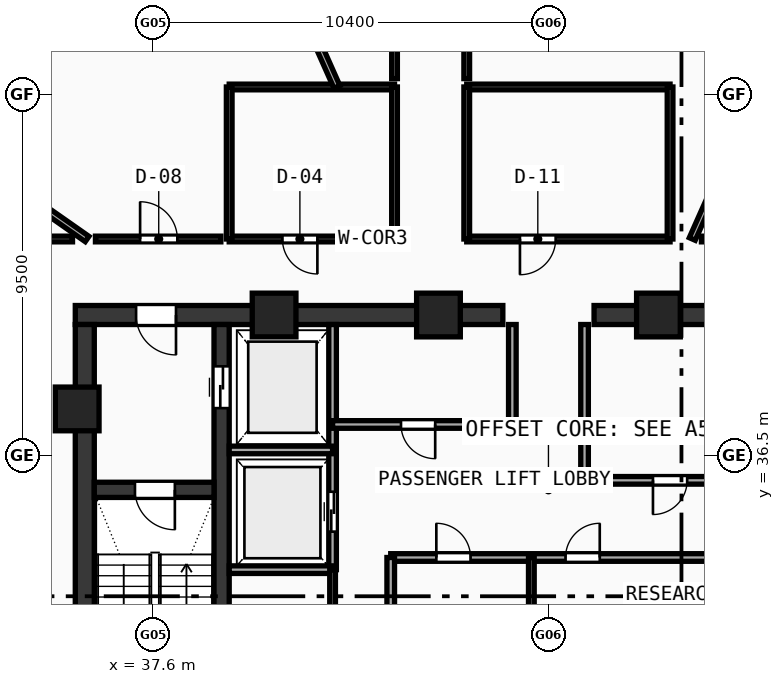
"""IFC4 building model, lengths in metres.
Left out: names, types, materials, properties, quantities, classifications, styles, units other than length and angle.
Written with IfcOpenShell. Run it as: python <this file> out.ifc"""

import sys

from ifc_helpers import new_model, si_unit, direction, frame, frame_2d, origin, origin_with_axes, origin_2d, place, context, subcontext, project, spatial, rectangle, hollow_rectangle, extrude, source, transform, mapped, element, fill, save


model = new_model("IFC4")
c1 = context("Model", 3, precision=1e-05, world=origin(), true_north=direction((0.0, 1.0)))
c2 = subcontext(c1, "Body", "Model", "MODEL_VIEW")
j1 = project(units=[si_unit("LENGTHUNIT", "METRE"), si_unit("PLANEANGLEUNIT", "RADIAN")], contexts=[c1])
p1 = place(None, origin())
s1 = spatial("IfcSite", under=j1, at=p1, CompositionType="ELEMENT")
p2 = place(p1, origin())
s2 = spatial("IfcBuilding", under=s1, at=p2, CompositionType="ELEMENT")
p3 = place(p2, frame((0.0, 0.0, 266.91)))
s3 = spatial("IfcBuildingStorey", under=s2, at=p3, CompositionType="ELEMENT", Elevation=266.91)
p4 = place(p3, frame((35.55, 40.2, 0.0), z_axis=(0.0, 0.0, 1.0), x_axis=(1.0, 0.0, 0.0)))
e1 = element("IfcWall", 1, at=p4, inside=s3, PredefinedType="SHEAR", context=c2, shape_type="SweptSolid", body=[
    extrude(rectangle(XDim=11.25, YDim=0.5, at=frame_2d((5.625, 0.0))), origin(), (0.0, 0.0, 1.0), 5.57),
])
p5 = place(p4, frame((1.6, 0.0, 0.0)))
e2 = element("IfcOpeningElement", 2, at=p5, cuts=e1, PredefinedType="OPENING", context=c2, shape_type="SweptSolid", body=[
    extrude(rectangle(XDim=1.05, YDim=2.1, at=frame_2d((0.525, 1.05))), frame((0.0, 0.26, 0.0), z_axis=(0.0, -1.0, 0.0), x_axis=(1.0, 0.0, 0.0)), (0.0, 0.0, 1.0), 0.52),
])
p6 = place(p3, frame((49.2, 40.2, 0.0), z_axis=(0.0, 0.0, 1.0), x_axis=(1.0, 0.0, 0.0)))
e3 = element("IfcWall", 3, at=p6, inside=s3, PredefinedType="SHEAR", context=c2, shape_type="SweptSolid", body=[
    extrude(rectangle(XDim=11.25, YDim=0.5, at=frame_2d((5.625, 0.0))), origin(), (0.0, 0.0, 1.0), 5.57),
])
p7 = place(p6, frame((8.6, 0.0, 0.0)))
e4 = element("IfcOpeningElement", 4, at=p7, cuts=e3, PredefinedType="OPENING", context=c2, shape_type="SweptSolid", body=[
    extrude(rectangle(XDim=1.05, YDim=2.1, at=frame_2d((0.525, 1.05))), frame((0.0, 0.26, 0.0), z_axis=(0.0, -1.0, 0.0), x_axis=(1.0, 0.0, 0.0)), (0.0, 0.0, 1.0), 0.52),
])
p8 = place(p3, frame((35.8, 27.75, 0.0), z_axis=(0.0, 0.0, 1.0), x_axis=(0.0, 1.0, 0.0)))
e5 = element("IfcWall", 5, at=p8, inside=s3, PredefinedType="SHEAR", context=c2, shape_type="SweptSolid", body=[
    extrude(rectangle(XDim=12.2, YDim=0.5, at=frame_2d((6.1, 0.0))), origin(), (0.0, 0.0, 1.0), 5.57),
])
p9 = place(p3, frame((39.4, 27.75, 0.0), z_axis=(0.0, 0.0, 1.0), x_axis=(0.0, 1.0, 0.0)))
e6 = element("IfcWall", 6, at=p9, inside=s3, PredefinedType="SHEAR", context=c2, shape_type="SweptSolid", body=[
    extrude(rectangle(XDim=12.2, YDim=0.4, at=frame_2d((6.1, 0.0))), origin(), (0.0, 0.0, 1.0), 5.57),
])
p10 = place(p9, frame((10.0, 0.0, 0.0)))
e7 = element("IfcOpeningElement", 7, at=p10, cuts=e6, PredefinedType="OPENING", context=c2, shape_type="SweptSolid", body=[
    extrude(rectangle(XDim=1.1, YDim=2.1, at=frame_2d((0.55, 1.05))), frame((0.0, 0.21, 0.0), z_axis=(0.0, -1.0, 0.0), x_axis=(1.0, 0.0, 0.0)), (0.0, 0.0, 1.0), 0.42),
])
p11 = place(p3, frame((36.05, 35.6, 0.0), z_axis=(0.0, 0.0, 1.0), x_axis=(1.0, 0.0, 0.0)))
e8 = element("IfcWall", 8, at=p11, inside=s3, PredefinedType="SHEAR", context=c2, shape_type="SweptSolid", body=[
    extrude(rectangle(XDim=3.15, YDim=0.4, at=frame_2d((1.575, 0.0))), origin(), (0.0, 0.0, 1.0), 5.57),
])
p12 = place(p11, frame((1.07, 0.0, 0.0)))
e9 = element("IfcOpeningElement", 9, at=p12, cuts=e8, PredefinedType="OPENING", context=c2, shape_type="SweptSolid", body=[
    extrude(rectangle(XDim=1.05, YDim=2.1, at=frame_2d((0.525, 1.05))), frame((0.0, 0.21, 0.0), z_axis=(0.0, -1.0, 0.0), x_axis=(1.0, 0.0, 0.0)), (0.0, 0.0, 1.0), 0.42),
])
m1 = source(origin(), c2, "Body", "SweptSolid", [
    extrude(hollow_rectangle(XDim=1.15, YDim=1.15, WallThickness=0.048, at=origin_2d()), origin(), (0.0, 0.0, 1.0), 5.83),
])
for number, where, z_axis, x_axis in (
    (10, (50.894, 40.2, -0.26), (0.0, 0.0, 1.0), (1.0, 0.0, 0.0)),
    (11, (45.106, 40.2, -0.26), (0.0, 0.0, 1.0), (1.0, 0.0, 0.0)),
    (12, (40.781, 40.2, -0.26), (0.0, 0.0, 1.0), (1.0, 0.0, 0.0)),
    (13, (35.6, 37.729, -0.26), (0.0, 0.0, 1.0), (1.0, 0.0, 0.0)),
):
    element("IfcColumn", number, at=place(p3, frame(where, z_axis=z_axis, x_axis=x_axis)), inside=s3, PredefinedType="COLUMN", context=c2, shape_type="MappedRepresentation", body=[
        mapped(m1, transform((0.0, 0.0, 0.0), scale=1.0)),
    ])
p13 = place(p3, frame((42.32, 33.5, 0.0), z_axis=(0.0, 0.0, 1.0), x_axis=(0.0, 1.0, 0.0)))
e14 = element("IfcWall", 14, at=p13, inside=s3, PredefinedType="SOLIDWALL", context=c2, shape_type="SweptSolid", body=[
    extrude(rectangle(XDim=6.45, YDim=0.2, at=frame_2d((3.225, 0.0))), origin(), (0.0, 0.0, 1.0), 5.57),
])
p14 = place(p13, frame((1.0, 0.0, 0.0)))
e15 = element("IfcOpeningElement", 15, at=p14, cuts=e14, PredefinedType="OPENING", context=c2, shape_type="SweptSolid", body=[
    extrude(rectangle(XDim=1.05, YDim=2.1, at=frame_2d((0.525, 1.05))), frame((0.0, 0.11, 0.0), z_axis=(0.0, -1.0, 0.0), x_axis=(1.0, 0.0, 0.0)), (0.0, 0.0, 1.0), 0.22),
])
for number, where, z_axis, x_axis in (
    (16, (39.6, 36.65, 0.0), (0.0, 0.0, 1.0), (1.0, 0.0, 0.0)),
    (17, (39.6, 33.5, 0.0), (0.0, 0.0, 1.0), (1.0, 0.0, 0.0)),
):
    element("IfcWall", number, at=place(p3, frame(where, z_axis=z_axis, x_axis=x_axis)), inside=s3, PredefinedType="SOLIDWALL", context=c2, shape_type="SweptSolid", body=[
        extrude(rectangle(XDim=2.72, YDim=0.2, at=frame_2d((1.36, 0.0))), origin(), (0.0, 0.0, 1.0), 5.57),
    ])
p15 = place(p3, frame((42.32, 37.32, 0.0), z_axis=(0.0, 0.0, 1.0), x_axis=(1.0, 0.0, 0.0)))
e18 = element("IfcWall", 18, at=p15, inside=s3, PredefinedType="SOLIDWALL", context=c2, shape_type="SweptSolid", body=[
    extrude(rectangle(XDim=4.73, YDim=0.2, at=frame_2d((2.365, 0.0))), origin(), (0.0, 0.0, 1.0), 5.57),
])
p16 = place(p15, frame((1.8, 0.0, 0.0)))
e19 = element("IfcOpeningElement", 19, at=p16, cuts=e18, PredefinedType="OPENING", context=c2, shape_type="SweptSolid", body=[
    extrude(rectangle(XDim=0.9, YDim=2.1, at=frame_2d((0.45, 1.05))), frame((0.0, 0.11, 0.0), z_axis=(0.0, -1.0, 0.0), x_axis=(1.0, 0.0, 0.0)), (0.0, 0.0, 1.0), 0.22),
])
p17 = place(p3, frame((48.95, 35.85, 0.0), z_axis=(0.0, 0.0, 1.0), x_axis=(1.0, 0.0, 0.0)))
e20 = element("IfcWall", 20, at=p17, inside=s3, PredefinedType="SOLIDWALL", context=c2, shape_type="SweptSolid", body=[
    extrude(rectangle(XDim=4.73, YDim=0.2, at=frame_2d((2.365, 0.0))), origin(), (0.0, 0.0, 1.0), 5.57),
])
p18 = place(p17, frame((1.8, 0.0, 0.0)))
e21 = element("IfcOpeningElement", 21, at=p18, cuts=e20, PredefinedType="OPENING", context=c2, shape_type="SweptSolid", body=[
    extrude(rectangle(XDim=0.9, YDim=2.1, at=frame_2d((0.45, 1.05))), frame((0.0, 0.11, 0.0), z_axis=(0.0, -1.0, 0.0), x_axis=(1.0, 0.0, 0.0)), (0.0, 0.0, 1.0), 0.22),
])
p19 = place(p3, frame((47.05, 37.32, 0.0), z_axis=(0.0, 0.0, 1.0), x_axis=(0.0, 1.0, 0.0)))
e22 = element("IfcWall", 22, at=p19, inside=s3, PredefinedType="SOLIDWALL", context=c2, shape_type="SweptSolid", body=[
    extrude(rectangle(XDim=2.63, YDim=0.2, at=frame_2d((1.315, 0.0))), origin(), (0.0, 0.0, 1.0), 5.57),
])
p20 = place(p3, frame((48.95, 35.85, 0.0), z_axis=(0.0, 0.0, 1.0), x_axis=(0.0, 1.0, 0.0)))
e23 = element("IfcWall", 23, at=p20, inside=s3, PredefinedType="SOLIDWALL", context=c2, shape_type="SweptSolid", body=[
    extrude(rectangle(XDim=4.1, YDim=0.2, at=frame_2d((2.05, 0.0))), origin(), (0.0, 0.0, 1.0), 5.57),
])
p21 = place(p3, frame((43.85, 33.82, 0.0), z_axis=(0.0, 0.0, 1.0), x_axis=(1.0, 0.0, 0.0)))
e24 = element("IfcWall", 24, at=p21, inside=s3, PredefinedType="SOLIDWALL", context=c2, shape_type="SweptSolid", body=[
    extrude(rectangle(XDim=9.83, YDim=0.2, at=frame_2d((4.915, 0.0))), origin(), (0.0, 0.0, 1.0), 5.57),
])
p22 = place(p21, frame((1.2, 0.0, 0.0)))
e25 = element("IfcOpeningElement", 25, at=p22, cuts=e24, PredefinedType="OPENING", context=c2, shape_type="SweptSolid", body=[
    extrude(rectangle(XDim=0.9, YDim=2.1, at=frame_2d((0.45, 1.05))), frame((0.0, 0.11, 0.0), z_axis=(0.0, -1.0, 0.0), x_axis=(1.0, 0.0, 0.0)), (0.0, 0.0, 1.0), 0.22),
])
p23 = place(p21, frame((4.6, 0.0, 0.0)))
e26 = element("IfcOpeningElement", 26, at=p23, cuts=e24, PredefinedType="OPENING", context=c2, shape_type="SweptSolid", body=[
    extrude(rectangle(XDim=0.9, YDim=2.1, at=frame_2d((0.45, 1.05))), frame((0.0, 0.11, 0.0), z_axis=(0.0, -1.0, 0.0), x_axis=(1.0, 0.0, 0.0)), (0.0, 0.0, 1.0), 0.22),
])
p24 = place(p3, frame((43.85, 27.6, 0.0), z_axis=(0.0, 0.0, 1.0), x_axis=(0.0, 1.0, 0.0)))
e27 = element("IfcWall", 27, at=p24, inside=s3, PredefinedType="SOLIDWALL", context=c2, shape_type="SweptSolid", body=[
    extrude(rectangle(XDim=6.22, YDim=0.2, at=frame_2d((3.11, 0.0))), origin(), (0.0, 0.0, 1.0), 5.57),
])
p25 = place(p24, frame((2.25, 0.0, 0.0)))
e28 = element("IfcOpeningElement", 28, at=p25, cuts=e27, PredefinedType="OPENING", context=c2, shape_type="SweptSolid", body=[
    extrude(rectangle(XDim=1.05, YDim=2.1, at=frame_2d((0.525, 1.05))), frame((0.0, 0.11, 0.0), z_axis=(0.0, -1.0, 0.0), x_axis=(1.0, 0.0, 0.0)), (0.0, 0.0, 1.0), 0.22),
])
p26 = place(p3, frame((47.55, 31.12, 0.0), z_axis=(0.0, 0.0, 1.0), x_axis=(0.0, 1.0, 0.0)))
e29 = element("IfcWall", 29, at=p26, inside=s3, PredefinedType="PARTITIONING", context=c2, shape_type="SweptSolid", body=[
    extrude(rectangle(XDim=2.7, YDim=0.15, at=frame_2d((1.35, 0.0))), origin(), (0.0, 0.0, 1.0), 5.57),
])
p27 = place(p3, frame((42.32, 27.6, 0.0), z_axis=(0.0, 0.0, 1.0), x_axis=(0.0, 1.0, 0.0)))
e30 = element("IfcWall", 30, at=p27, inside=s3, PredefinedType="PARTITIONING", context=c2, shape_type="SweptSolid", body=[
    extrude(rectangle(XDim=5.9, YDim=0.15, at=frame_2d((2.95, 0.0))), origin(), (0.0, 0.0, 1.0), 2.22),
])
p28 = place(p27, frame((1.1, 0.0, 0.0)))
e31 = element("IfcOpeningElement", 31, at=p28, cuts=e30, PredefinedType="OPENING", context=c2, shape_type="SweptSolid", body=[
    extrude(rectangle(XDim=0.9, YDim=2.1, at=frame_2d((0.45, 1.05))), frame((0.0, 0.085, 0.0), z_axis=(0.0, -1.0, 0.0), x_axis=(1.0, 0.0, 0.0)), (0.0, 0.0, 1.0), 0.17),
])
p29 = place(p27, frame((3.6, 0.0, 0.0)))
e32 = element("IfcOpeningElement", 32, at=p29, cuts=e30, PredefinedType="OPENING", context=c2, shape_type="SweptSolid", body=[
    extrude(rectangle(XDim=0.94, YDim=2.1, at=frame_2d((0.47, 1.05))), frame((0.0, 0.085, 0.0), z_axis=(0.0, -1.0, 0.0), x_axis=(1.0, 0.0, 0.0)), (0.0, 0.0, 1.0), 0.17),
])
p30 = place(p3, frame((39.6, 42.2, 0.0), z_axis=(0.0, 0.0, 1.0), x_axis=(1.0, 0.0, 0.0)))
e33 = element("IfcWall", 33, at=p30, inside=s3, PredefinedType="PARTITIONING", context=c2, shape_type="SweptSolid", body=[
    extrude(rectangle(XDim=4.35, YDim=0.15, at=frame_2d((2.175, 0.0))), origin(), (0.0, 0.0, 1.0), 2.22),
])
p31 = place(p30, frame((1.4, 0.0, 0.0)))
e34 = element("IfcOpeningElement", 34, at=p31, cuts=e33, PredefinedType="OPENING", context=c2, shape_type="SweptSolid", body=[
    extrude(rectangle(XDim=0.92, YDim=2.1, at=frame_2d((0.46, 1.05))), frame((0.0, 0.085, 0.0), z_axis=(0.0, -1.0, 0.0), x_axis=(1.0, 0.0, 0.0)), (0.0, 0.0, 1.0), 0.17),
])
p32 = place(p3, frame((39.6, 46.2, 0.0), z_axis=(0.0, 0.0, 1.0), x_axis=(1.0, 0.0, 0.0)))
e35 = element("IfcWall", 35, at=p32, inside=s3, PredefinedType="PARTITIONING", context=c2, shape_type="SweptSolid", body=[
    extrude(rectangle(XDim=4.35, YDim=0.15, at=frame_2d((2.175, 0.0))), origin(), (0.0, 0.0, 1.0), 2.22),
])
p33 = place(p3, frame((39.6, 42.2, 0.0), z_axis=(0.0, 0.0, 1.0), x_axis=(0.0, 1.0, 0.0)))
e36 = element("IfcWall", 36, at=p33, inside=s3, PredefinedType="PARTITIONING", context=c2, shape_type="SweptSolid", body=[
    extrude(rectangle(XDim=4.0, YDim=0.15, at=frame_2d((2.0, 0.0))), origin(), (0.0, 0.0, 1.0), 5.22),
])
p34 = place(p3, frame((43.95, 42.2, 0.0), z_axis=(0.0, 0.0, 1.0), x_axis=(0.0, 1.0, 0.0)))
e37 = element("IfcWall", 37, at=p34, inside=s3, PredefinedType="PARTITIONING", context=c2, shape_type="SweptSolid", body=[
    extrude(rectangle(XDim=4.0, YDim=0.15, at=frame_2d((2.0, 0.0))), origin(), (0.0, 0.0, 1.0), 2.22),
])
p35 = place(p3, frame((45.85, 42.2, 0.0), z_axis=(0.0, 0.0, 1.0), x_axis=(1.0, 0.0, 0.0)))
e38 = element("IfcWall", 38, at=p35, inside=s3, PredefinedType="PARTITIONING", context=c2, shape_type="SweptSolid", body=[
    extrude(rectangle(XDim=5.35, YDim=0.15, at=frame_2d((2.675, 0.0))), origin(), (0.0, 0.0, 1.0), 5.57),
])
p36 = place(p35, frame((1.4, 0.0, 0.0)))
e39 = element("IfcOpeningElement", 39, at=p36, cuts=e38, PredefinedType="OPENING", context=c2, shape_type="SweptSolid", body=[
    extrude(rectangle(XDim=0.94, YDim=2.1, at=frame_2d((0.47, 1.05))), frame((0.0, 0.085, 0.0), z_axis=(0.0, -1.0, 0.0), x_axis=(1.0, 0.0, 0.0)), (0.0, 0.0, 1.0), 0.17),
])
p37 = place(p3, frame((45.85, 46.2, 0.0), z_axis=(0.0, 0.0, 1.0), x_axis=(1.0, 0.0, 0.0)))
e40 = element("IfcWall", 40, at=p37, inside=s3, PredefinedType="PARTITIONING", context=c2, shape_type="SweptSolid", body=[
    extrude(rectangle(XDim=5.35, YDim=0.15, at=frame_2d((2.675, 0.0))), origin(), (0.0, 0.0, 1.0), 5.57),
])
for number, where, z_axis, x_axis in (
    (41, (45.85, 42.2, 0.0), (0.0, 0.0, 1.0), (0.0, 1.0, 0.0)),
    (42, (51.2, 42.2, 0.0), (0.0, 0.0, 1.0), (0.0, 1.0, 0.0)),
):
    element("IfcWall", number, at=place(p3, frame(where, z_axis=z_axis, x_axis=x_axis)), inside=s3, PredefinedType="PARTITIONING", context=c2, shape_type="SweptSolid", body=[
        extrude(rectangle(XDim=4.0, YDim=0.15, at=frame_2d((2.0, 0.0))), origin(), (0.0, 0.0, 1.0), 5.57),
    ])
p38 = place(p3, frame((51.784, 42.2, 0.0), z_axis=(0.0, 0.0, 1.0), x_axis=(0.406737985753, 0.913544859843, 0.0)))
e43 = element("IfcWall", 43, at=p38, inside=s3, PredefinedType="PARTITIONING", context=c2, shape_type="SweptSolid", body=[
    extrude(rectangle(XDim=24.707, YDim=0.17, at=frame_2d((12.354, 0.0))), origin(), (0.0, 0.0, 1.0), 2.22),
])
p39 = place(p3, frame((42.435, 46.2, 0.0), z_axis=(0.0, 0.0, 1.0), x_axis=(-0.406734534197, 0.913546396573, 0.0)))
e44 = element("IfcWall", 44, at=p39, inside=s3, PredefinedType="PARTITIONING", context=c2, shape_type="SweptSolid", body=[
    extrude(rectangle(XDim=20.329, YDim=0.17, at=frame_2d((10.164, 0.0))), origin(), (0.0, 0.0, 1.0), 2.22),
])
p40 = place(p3, frame((35.861, 42.2, 0.0), z_axis=(0.0, 0.0, 1.0), x_axis=(-0.819147381932, 0.57358309483, 0.0)))
e45 = element("IfcWall", 45, at=p40, inside=s3, PredefinedType="PARTITIONING", context=c2, shape_type="SweptSolid", body=[
    extrude(rectangle(XDim=13.297, YDim=0.17, at=frame_2d((6.649, 0.0))), origin(), (0.0, 0.0, 1.0), 4.92),
])
p41 = place(p3, frame((33.15, 42.2, 0.0), z_axis=(0.0, 0.0, 1.0), x_axis=(1.0, 0.0, 0.0)))
e46 = element("IfcWall", 46, at=p41, inside=s3, PredefinedType="PARTITIONING", context=c2, shape_type="SweptSolid", body=[
    extrude(rectangle(XDim=2.327, YDim=0.15, at=frame_2d((1.164, 0.0))), origin(), (0.0, 0.0, 1.0), 5.22),
])
p42 = place(p3, frame((36.081, 42.2, 0.0), z_axis=(0.0, 0.0, 1.0), x_axis=(1.0, 0.0, 0.0)))
e47 = element("IfcWall", 47, at=p42, inside=s3, PredefinedType="PARTITIONING", context=c2, shape_type="SweptSolid", body=[
    extrude(rectangle(XDim=3.299, YDim=0.15, at=frame_2d((1.65, 0.0))), origin(), (0.0, 0.0, 1.0), 2.22),
])
p43 = place(p42, frame((1.175, 0.0, 0.0)))
e48 = element("IfcOpeningElement", 48, at=p43, cuts=e47, PredefinedType="OPENING", context=c2, shape_type="SweptSolid", body=[
    extrude(rectangle(XDim=0.98, YDim=2.12, at=frame_2d((0.49, 1.06))), frame((0.0, 0.085, 0.0), z_axis=(0.0, -1.0, 0.0), x_axis=(1.0, 0.0, 0.0)), (0.0, 0.0, 1.0), 0.17),
])
p44 = place(p3, frame((43.95, 46.42, 0.0), z_axis=(0.0, 0.0, 1.0), x_axis=(0.0, 1.0, 0.0)))
e49 = element("IfcWall", 49, at=p44, inside=s3, PredefinedType="PARTITIONING", context=c2, shape_type="SweptSolid", body=[
    extrude(rectangle(XDim=9.36, YDim=0.15, at=frame_2d((4.68, 0.0))), origin(), (0.0, 0.0, 1.0), 5.22),
])
p45 = place(p44, frame((4.11, 0.0, 0.0)))
e50 = element("IfcOpeningElement", 50, at=p45, cuts=e49, PredefinedType="OPENING", context=c2, shape_type="SweptSolid", body=[
    extrude(rectangle(XDim=0.92, YDim=2.1, at=frame_2d((0.46, 1.05))), frame((0.0, 0.085, 0.0), z_axis=(0.0, -1.0, 0.0), x_axis=(1.0, 0.0, 0.0)), (0.0, 0.0, 1.0), 0.17),
])
p46 = place(p3, frame((45.85, 55.78, 0.0), z_axis=(0.0, 0.0, 1.0), x_axis=(0.0, -1.0, 0.0)))
e51 = element("IfcWall", 51, at=p46, inside=s3, PredefinedType="PARTITIONING", context=c2, shape_type="SweptSolid", body=[
    extrude(rectangle(XDim=9.36, YDim=0.15, at=frame_2d((4.68, 0.0))), origin(), (0.0, 0.0, 1.0), 5.22),
])
p47 = place(p3, frame((52.025, 42.2, 0.0), z_axis=(0.0, 0.0, 1.0), x_axis=(1.0, 0.0, 0.0)))
e52 = element("IfcWall", 52, at=p47, inside=s3, PredefinedType="PARTITIONING", context=c2, shape_type="SweptSolid", body=[
    extrude(rectangle(XDim=10.825, YDim=0.15, at=frame_2d((5.413, 0.0))), origin(), (0.0, 0.0, 1.0), 2.22),
])
p48 = place(p47, frame((5.047, 0.0, 0.0)))
e53 = element("IfcOpeningElement", 53, at=p48, cuts=e52, PredefinedType="OPENING", context=c2, shape_type="SweptSolid", body=[
    extrude(rectangle(XDim=0.98, YDim=2.12, at=frame_2d((0.49, 1.06))), frame((0.0, 0.085, 0.0), z_axis=(0.0, -1.0, 0.0), x_axis=(1.0, 0.0, 0.0)), (0.0, 0.0, 1.0), 0.17),
])
m2 = source(origin(), c2, "Body", "SweptSolid", [
    extrude(rectangle(XDim=1.05, YDim=2.1, at=frame_2d((0.525, 1.05))), frame((0.0, 0.025, 0.0), z_axis=(0.0, -1.0, 0.0), x_axis=(1.0, 0.0, 0.0)), (0.0, 0.0, 1.0), 0.05),
])
p49 = place(p12, frame((1.05, 0.0, 0.0), z_axis=(0.0, 0.0, 1.0), x_axis=(-1.0, 0.0, 0.0)))
e54 = element("IfcDoor", 54, at=p49, inside=s3, OperationType="SINGLE_SWING_LEFT", PredefinedType="DOOR", context=c2, shape_type="MappedRepresentation", body=[
    mapped(m2, transform((0.0, 0.0, 0.0), scale=1.0)),
])
fill(e9, e54)
p50 = place(p5, frame((1.05, 0.0, 0.0), z_axis=(0.0, 0.0, 1.0), x_axis=(-1.0, 0.0, 0.0)))
e55 = element("IfcDoor", 55, at=p50, inside=s3, OperationType="SINGLE_SWING_LEFT", PredefinedType="DOOR", context=c2, shape_type="MappedRepresentation", body=[
    mapped(m2, transform((0.0, 0.0, 0.0), scale=1.0)),
])
fill(e2, e55)
m3 = source(origin(), c2, "Body", "SweptSolid", [
    extrude(rectangle(XDim=1.1, YDim=2.1, at=frame_2d((0.55, 1.05))), frame((0.0, 0.025, 0.0), z_axis=(0.0, -1.0, 0.0), x_axis=(1.0, 0.0, 0.0)), (0.0, 0.0, 1.0), 0.05),
])
p51 = place(p10, frame((1.1, 0.0, 0.0), z_axis=(0.0, 0.0, 1.0), x_axis=(-1.0, 0.0, 0.0)))
e56 = element("IfcDoor", 56, at=p51, inside=s3, OperationType="DOUBLE_DOOR_SLIDING", PredefinedType="DOOR", context=c2, shape_type="MappedRepresentation", body=[
    mapped(m3, transform((0.0, 0.0, 0.0), scale=1.0)),
])
fill(e7, e56)
p52 = place(p14, origin_with_axes())
e57 = element("IfcDoor", 57, at=p52, inside=s3, OperationType="DOUBLE_DOOR_SLIDING", PredefinedType="DOOR", context=c2, shape_type="MappedRepresentation", body=[
    mapped(m2, transform((0.0, 0.0, 0.0), scale=1.0)),
])
fill(e15, e57)
m4 = source(origin(), c2, "Body", "SweptSolid", [
    extrude(rectangle(XDim=0.9, YDim=2.1, at=frame_2d((0.45, 1.05))), frame((0.0, 0.025, 0.0), z_axis=(0.0, -1.0, 0.0), x_axis=(1.0, 0.0, 0.0)), (0.0, 0.0, 1.0), 0.05),
])
p53 = place(p16, frame((0.9, 0.0, 0.0), z_axis=(0.0, 0.0, 1.0), x_axis=(-1.0, 0.0, 0.0)))
e58 = element("IfcDoor", 58, at=p53, inside=s3, OperationType="SINGLE_SWING_LEFT", PredefinedType="DOOR", context=c2, shape_type="MappedRepresentation", body=[
    mapped(m4, transform((0.0, 0.0, 0.0), scale=1.0)),
])
fill(e19, e58)
p54 = place(p18, frame((0.9, 0.0, 0.0), z_axis=(0.0, 0.0, 1.0), x_axis=(-1.0, 0.0, 0.0)))
e59 = element("IfcDoor", 59, at=p54, inside=s3, OperationType="SINGLE_SWING_RIGHT", PredefinedType="DOOR", context=c2, shape_type="MappedRepresentation", body=[
    mapped(m4, transform((0.0, 0.0, 0.0), scale=1.0)),
])
fill(e21, e59)
p55 = place(p22, origin_with_axes())
e60 = element("IfcDoor", 60, at=p55, inside=s3, OperationType="SINGLE_SWING_LEFT", PredefinedType="DOOR", context=c2, shape_type="MappedRepresentation", body=[
    mapped(m4, transform((0.0, 0.0, 0.0), scale=1.0)),
])
fill(e25, e60)
p56 = place(p23, origin_with_axes())
e61 = element("IfcDoor", 61, at=p56, inside=s3, OperationType="SINGLE_SWING_RIGHT", PredefinedType="DOOR", context=c2, shape_type="MappedRepresentation", body=[
    mapped(m4, transform((0.0, 0.0, 0.0), scale=1.0)),
])
fill(e26, e61)
m5 = source(origin(), c2, "Body", "SweptSolid", [
    extrude(rectangle(XDim=0.92, YDim=2.1, at=frame_2d((0.46, 1.05))), frame((0.0, 0.025, 0.0), z_axis=(0.0, -1.0, 0.0), x_axis=(1.0, 0.0, 0.0)), (0.0, 0.0, 1.0), 0.05),
])
p57 = place(p31, frame((0.92, 0.0, 0.0), z_axis=(0.0, 0.0, 1.0), x_axis=(-1.0, 0.0, 0.0)))
e62 = element("IfcDoor", 62, at=p57, inside=s3, OperationType="SINGLE_SWING_LEFT", PredefinedType="DOOR", context=c2, shape_type="MappedRepresentation", body=[
    mapped(m5, transform((0.0, 0.0, 0.0), scale=1.0)),
])
fill(e34, e62)
m6 = source(origin(), c2, "Body", "SweptSolid", [
    extrude(rectangle(XDim=0.94, YDim=2.1, at=frame_2d((0.47, 1.05))), frame((0.0, 0.025, 0.0), z_axis=(0.0, -1.0, 0.0), x_axis=(1.0, 0.0, 0.0)), (0.0, 0.0, 1.0), 0.05),
])
p58 = place(p36, frame((0.94, 0.0, 0.0), z_axis=(0.0, 0.0, 1.0), x_axis=(-1.0, 0.0, 0.0)))
e63 = element("IfcDoor", 63, at=p58, inside=s3, OperationType="SINGLE_SWING_RIGHT", PredefinedType="DOOR", context=c2, shape_type="MappedRepresentation", body=[
    mapped(m6, transform((0.0, 0.0, 0.0), scale=1.0)),
])
fill(e39, e63)
m7 = source(origin(), c2, "Body", "SweptSolid", [
    extrude(rectangle(XDim=0.98, YDim=2.12, at=frame_2d((0.49, 1.06))), frame((0.0, 0.025, 0.0), z_axis=(0.0, -1.0, 0.0), x_axis=(1.0, 0.0, 0.0)), (0.0, 0.0, 1.0), 0.05),
])
p59 = place(p43, origin_with_axes())
e64 = element("IfcDoor", 64, at=p59, inside=s3, OperationType="SINGLE_SWING_LEFT", PredefinedType="DOOR", context=c2, shape_type="MappedRepresentation", body=[
    mapped(m7, transform((0.0, 0.0, 0.0), scale=1.0)),
])
fill(e48, e64)
save(model, sys.argv[1])
